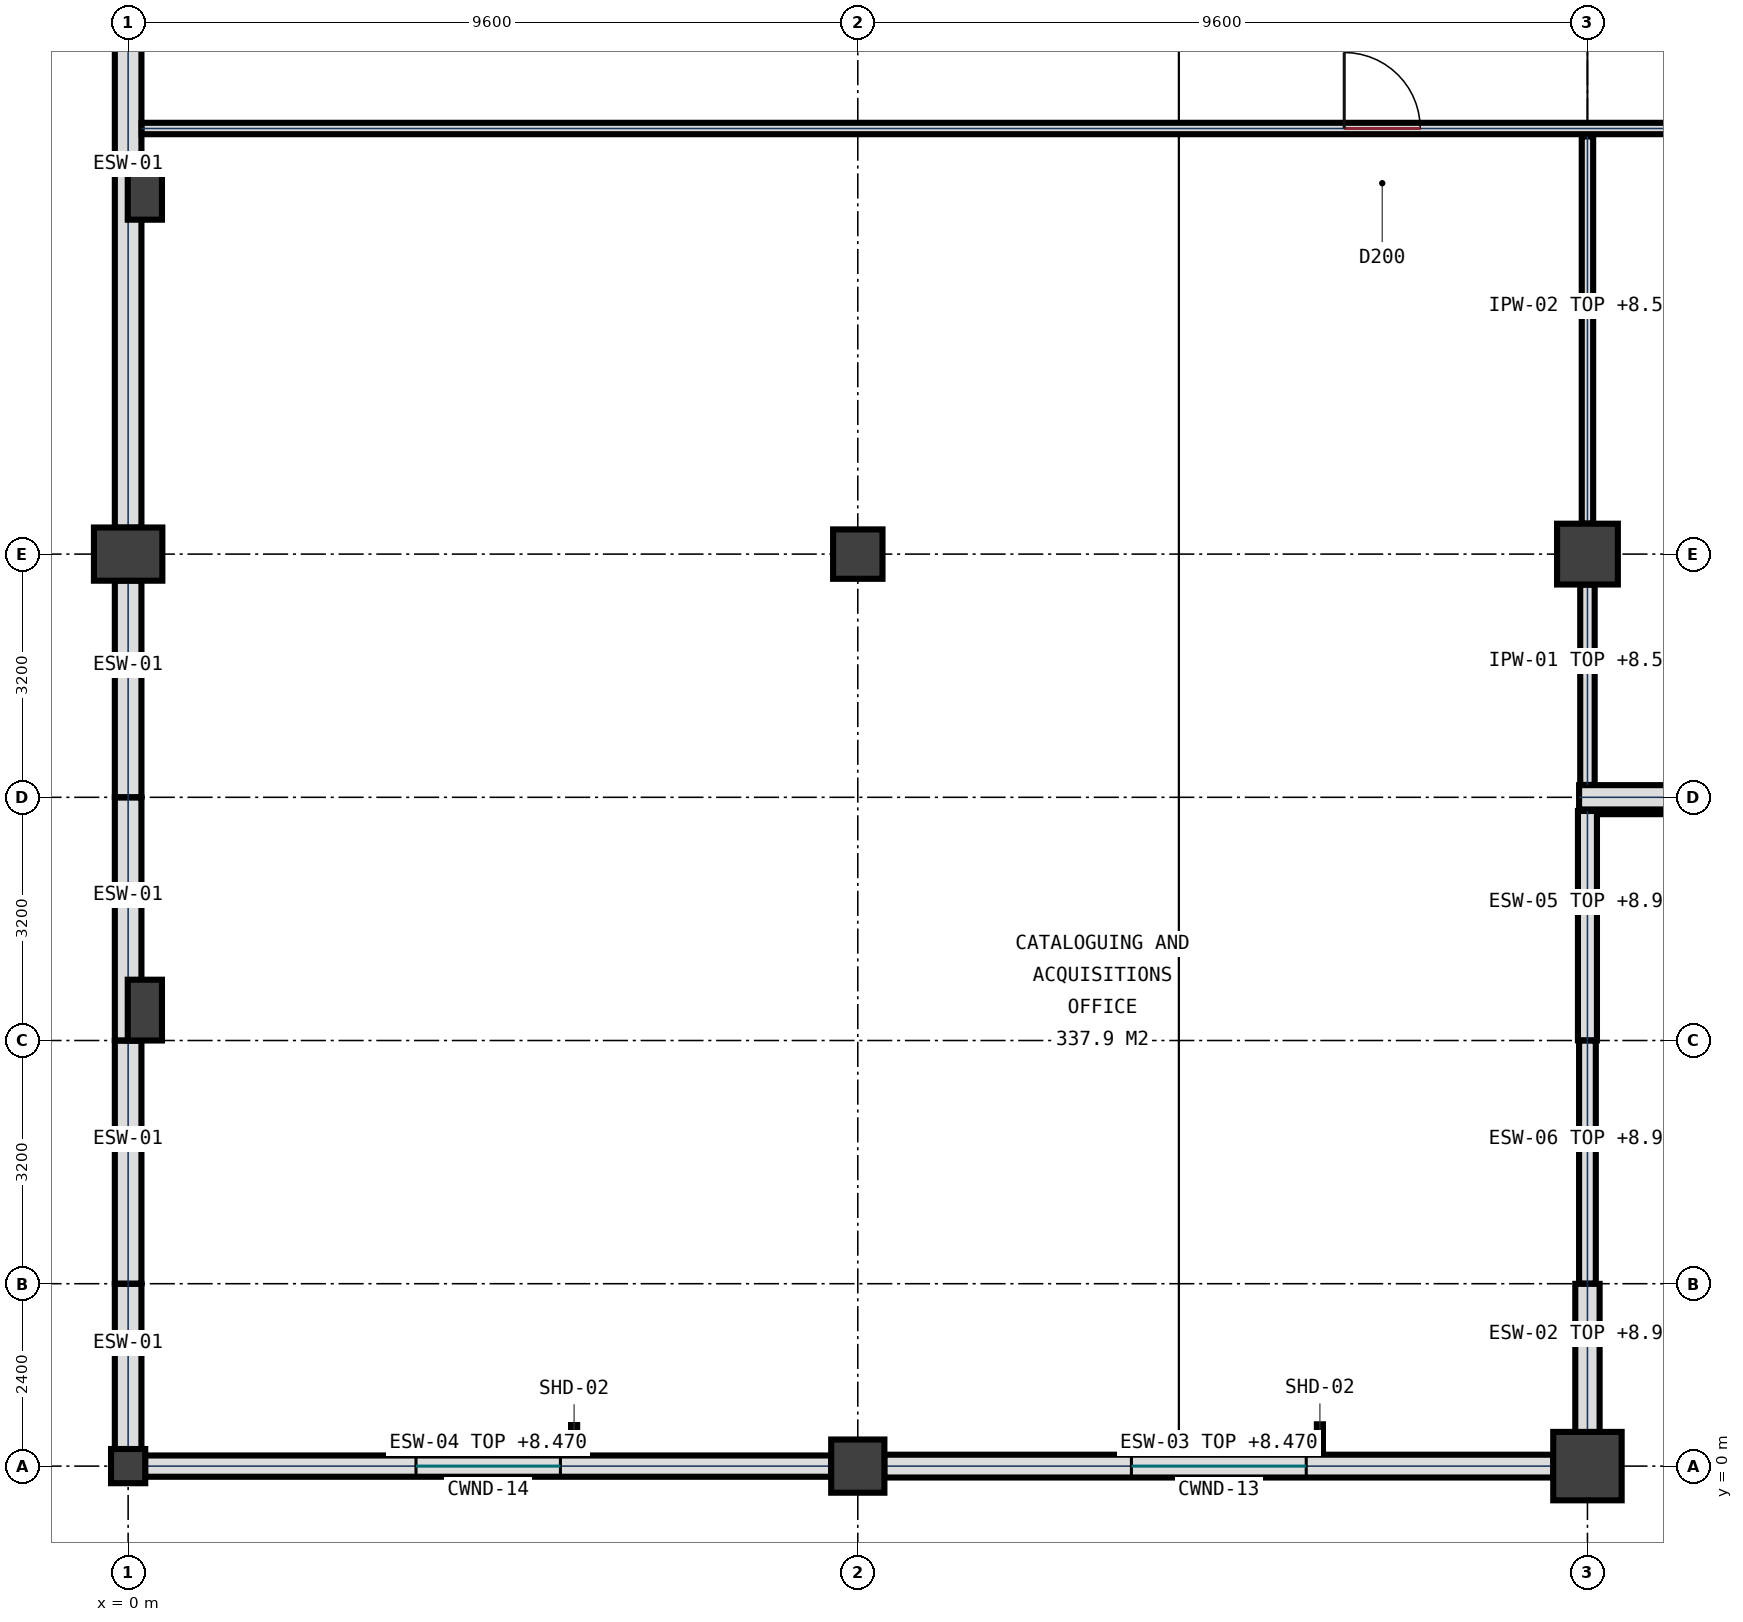
"""IFC4 building model, lengths in metres.
Left out: names, types, materials, properties, quantities, classifications, styles, units other than length and angle.
Written with IfcOpenShell. Run it as: python <this file> out.ifc"""

import sys

from ifc_helpers import new_model, si_unit, direction, frame, frame_2d, origin, origin_with_axes, origin_2d, place, context, subcontext, project, spatial, polyline, rectangle, circle, outline, extrude, element, fill, save


model = new_model("IFC4")
c1 = context("Model", 3, precision=1e-05, world=origin(), true_north=direction((0.0, 1.0)))
c2 = subcontext(c1, "Body", "Model", "MODEL_VIEW")
j1 = project(units=[si_unit("LENGTHUNIT", "METRE"), si_unit("PLANEANGLEUNIT", "RADIAN")], contexts=[c1])
p1 = place(None, origin())
s1 = spatial("IfcSite", under=j1, at=p1, CompositionType="ELEMENT")
p2 = place(p1, origin())
s2 = spatial("IfcBuilding", under=s1, at=p2, CompositionType="ELEMENT")
p3 = place(p2, frame((0.0, 0.0, 5.4)))
s3 = spatial("IfcBuildingStorey", under=s2, at=p3, CompositionType="ELEMENT", Elevation=5.4)
p4 = place(p3, origin_with_axes())
e1 = element("IfcColumn", 1, at=p4, inside=s3, PredefinedType="COLUMN", context=c2, shape_type="SweptSolid", body=[
    extrude(rectangle(XDim=0.45, YDim=0.45, at=origin_2d()), origin(), (0.0, 0.0, 1.0), 4.5),
])
p5 = place(p3, frame((0.0, 12.0, 0.0), z_axis=(0.0, 0.0, 1.0), x_axis=(1.0, 0.0, 0.0)))
e2 = element("IfcColumn", 2, at=p5, inside=s3, PredefinedType="COLUMN", context=c2, shape_type="SweptSolid", body=[
    extrude(rectangle(XDim=0.9, YDim=0.7, at=origin_2d()), origin(), (0.0, 0.0, 1.0), 4.5),
])
p6 = place(p3, frame((9.6, 0.0, 0.0), z_axis=(0.0, 0.0, 1.0), x_axis=(1.0, 0.0, 0.0)))
e3 = element("IfcColumn", 3, at=p6, inside=s3, PredefinedType="COLUMN", context=c2, shape_type="SweptSolid", body=[
    extrude(rectangle(XDim=0.7, YDim=0.7, at=origin_2d()), origin(), (0.0, 0.0, 1.0), 4.5),
])
p7 = place(p3, frame((9.6, 12.0, 0.0), z_axis=(0.0, 0.0, 1.0), x_axis=(1.0, 0.0, 0.0)))
e4 = element("IfcColumn", 4, at=p7, inside=s3, PredefinedType="COLUMN", context=c2, shape_type="SweptSolid", body=[
    extrude(rectangle(XDim=0.65, YDim=0.65, at=origin_2d()), origin(), (0.0, 0.0, 1.0), 4.5),
])
p8 = place(p3, frame((19.2, 0.0, 0.0), z_axis=(0.0, 0.0, 1.0), x_axis=(1.0, 0.0, 0.0)))
e5 = element("IfcColumn", 5, at=p8, inside=s3, PredefinedType="COLUMN", context=c2, shape_type="SweptSolid", body=[
    extrude(circle(Radius=0.45, at=origin_2d()), origin(), (0.0, 0.0, 1.0), 4.5),
])
p9 = place(p3, frame((19.2, 12.0, 0.0), z_axis=(0.0, 0.0, 1.0), x_axis=(1.0, 0.0, 0.0)))
e6 = element("IfcColumn", 6, at=p9, inside=s3, PredefinedType="COLUMN", context=c2, shape_type="SweptSolid", body=[
    extrude(circle(Radius=0.4, at=origin_2d()), origin(), (0.0, 0.0, 1.0), 4.5),
])
for number, where, z_axis, x_axis in (
    (7, (0.22, 6.0, 0.0), (0.0, 0.0, 1.0), (1.0, 0.0, 0.0)),
    (8, (0.22, 16.8, 0.0), (0.0, 0.0, 1.0), (1.0, 0.0, 0.0)),
):
    element("IfcColumn", number, at=place(p3, frame(where, z_axis=z_axis, x_axis=x_axis)), inside=s3, PredefinedType="PILASTER", context=c2, shape_type="SweptSolid", body=[
        extrude(rectangle(XDim=0.45, YDim=0.8, at=origin_2d()), origin(), (0.0, 0.0, 1.0), 4.5),
    ])
p10 = place(p3, frame((19.2, 8.62, 0.0), z_axis=(0.0, 0.0, 1.0), x_axis=(0.0, -1.0, 0.0)))
e9 = element("IfcWall", 9, at=p10, inside=s3, PredefinedType="SOLIDWALL", context=c2, shape_type="SweptSolid", body=[
    extrude(rectangle(XDim=3.018, YDim=0.25, at=frame_2d((1.509, 0.0))), origin(), (0.0, 0.0, 1.0), 3.57),
])
p11 = place(p3, frame((19.2, 5.598, 0.0), z_axis=(0.0, 0.0, 1.0), x_axis=(0.0, -1.0, 0.0)))
e10 = element("IfcWall", 10, at=p11, inside=s3, PredefinedType="SOLIDWALL", context=c2, shape_type="SweptSolid", body=[
    extrude(rectangle(XDim=3.196, YDim=0.22, at=frame_2d((1.598, 0.0))), origin(), (0.0, 0.0, 1.0), 3.57),
])
p12 = place(p3, frame((19.2, 2.398, 0.0), z_axis=(0.0, 0.0, 1.0), x_axis=(0.0, -1.0, 0.0)))
e11 = element("IfcWall", 11, at=p12, inside=s3, PredefinedType="SOLIDWALL", context=c2, shape_type="SweptSolid", body=[
    extrude(rectangle(XDim=1.95, YDim=0.32, at=frame_2d((0.975, 0.0))), origin(), (0.0, 0.0, 1.0), 3.57),
])
p13 = place(p3, frame((18.752, 0.0, 0.0), z_axis=(0.0, 0.0, 1.0), x_axis=(-1.0, 0.0, 0.0)))
e12 = element("IfcWall", 12, at=p13, inside=s3, PredefinedType="SOLIDWALL", context=c2, shape_type="SweptSolid", body=[
    extrude(rectangle(XDim=8.804, YDim=0.3, at=frame_2d((4.402, 0.0))), origin(), (0.0, 0.0, 1.0), 3.07),
])
p14 = place(p13, frame((3.252, 0.0, 0.95)))
e13 = element("IfcOpeningElement", 13, at=p14, cuts=e12, PredefinedType="OPENING", context=c2, shape_type="SweptSolid", body=[
    extrude(rectangle(XDim=2.3, YDim=1.4, at=frame_2d((1.15, 0.7))), frame((0.0, 0.16, 0.0), z_axis=(0.0, -1.0, 0.0), x_axis=(1.0, 0.0, 0.0)), (0.0, 0.0, 1.0), 0.32),
])
p15 = place(p3, frame((9.252, 0.0, 0.0), z_axis=(0.0, 0.0, 1.0), x_axis=(-1.0, 0.0, 0.0)))
e14 = element("IfcWall", 14, at=p15, inside=s3, PredefinedType="SOLIDWALL", context=c2, shape_type="SweptSolid", body=[
    extrude(rectangle(XDim=9.029, YDim=0.28, at=frame_2d((4.515, 0.0))), origin(), (0.0, 0.0, 1.0), 3.07),
])
p16 = place(p15, frame((3.564, 0.0, 0.95)))
e15 = element("IfcOpeningElement", 15, at=p16, cuts=e14, PredefinedType="OPENING", context=c2, shape_type="SweptSolid", body=[
    extrude(rectangle(XDim=1.9, YDim=1.4, at=frame_2d((0.95, 0.7))), frame((0.0, 0.15, 0.0), z_axis=(0.0, -1.0, 0.0), x_axis=(1.0, 0.0, 0.0)), (0.0, 0.0, 1.0), 0.3),
])
p17 = place(p3, frame((0.0, 0.223, 0.0), z_axis=(0.0, 0.0, 1.0), x_axis=(0.0, 1.0, 0.0)))
e16 = element("IfcWall", 16, at=p17, inside=s3, PredefinedType="SOLIDWALL", context=c2, shape_type="SweptSolid", body=[
    extrude(rectangle(XDim=2.175, YDim=0.35, at=frame_2d((1.087, 0.0))), origin(), (0.0, 0.0, 1.0), 4.22),
])
p18 = place(p3, frame((0.0, 2.402, 0.0), z_axis=(0.0, 0.0, 1.0), x_axis=(0.0, 1.0, 0.0)))
e17 = element("IfcWall", 17, at=p18, inside=s3, PredefinedType="SOLIDWALL", context=c2, shape_type="SweptSolid", body=[
    extrude(rectangle(XDim=3.196, YDim=0.35, at=frame_2d((1.598, 0.0))), origin(), (0.0, 0.0, 1.0), 4.22),
])
p19 = place(p3, frame((0.0, 5.602, 0.0), z_axis=(0.0, 0.0, 1.0), x_axis=(0.0, 1.0, 0.0)))
e18 = element("IfcWall", 18, at=p19, inside=s3, PredefinedType="SOLIDWALL", context=c2, shape_type="SweptSolid", body=[
    extrude(rectangle(XDim=3.196, YDim=0.35, at=frame_2d((1.598, 0.0))), origin(), (0.0, 0.0, 1.0), 4.22),
])
p20 = place(p3, frame((0.0, 8.802, 0.0), z_axis=(0.0, 0.0, 1.0), x_axis=(0.0, 1.0, 0.0)))
e19 = element("IfcWall", 19, at=p20, inside=s3, PredefinedType="SOLIDWALL", context=c2, shape_type="SweptSolid", body=[
    extrude(rectangle(XDim=2.85, YDim=0.35, at=frame_2d((1.425, 0.0))), origin(), (0.0, 0.0, 1.0), 4.22),
])
p21 = place(p3, frame((0.0, 12.348, 0.0), z_axis=(0.0, 0.0, 1.0), x_axis=(0.0, 1.0, 0.0)))
e20 = element("IfcWall", 20, at=p21, inside=s3, PredefinedType="SOLIDWALL", context=c2, shape_type="SweptSolid", body=[
    extrude(rectangle(XDim=8.954, YDim=0.35, at=frame_2d((4.477, 0.0))), origin(), (0.0, 0.0, 1.0), 4.22),
])
p22 = place(p3, frame((32.698, 8.8, 0.0), z_axis=(0.0, 0.0, 1.0), x_axis=(-1.0, 0.0, 0.0)))
e21 = element("IfcWall", 21, at=p22, inside=s3, PredefinedType="SOLIDWALL", context=c2, shape_type="SweptSolid", body=[
    extrude(rectangle(XDim=13.608, YDim=0.32, at=frame_2d((6.804, 0.0))), origin(), (0.0, 0.0, 1.0), 3.52),
])
p23 = place(p22, frame((5.404, 0.0, 1.1)))
e22 = element("IfcOpeningElement", 22, at=p23, cuts=e21, PredefinedType="OPENING", context=c2, shape_type="SweptSolid", body=[
    extrude(outline(polyline([(0.375, 0.75), (0.247, 0.727), (0.134, 0.662), (0.05, 0.562), (0.006, 0.44), (0.006, 0.31), (0.05, 0.188), (0.134, 0.088), (0.247, 0.023), (0.375, 0.0), (2.425, 0.0), (2.553, 0.023), (2.666, 0.088), (2.75, 0.188), (2.794, 0.31), (2.794, 0.44), (2.75, 0.562), (2.666, 0.662), (2.553, 0.727), (2.425, 0.75), (0.375, 0.75)])), frame((0.0, 0.17, 0.0), z_axis=(0.0, -1.0, 0.0), x_axis=(1.0, 0.0, 0.0)), (0.0, 0.0, 1.0), 0.34),
])
p24 = place(p3, frame((0.178, 17.6, 0.0), z_axis=(0.0, 0.0, 1.0), x_axis=(1.0, 0.0, 0.0)))
e23 = element("IfcWall", 23, at=p24, inside=s3, PredefinedType="PARTITIONING", context=c2, shape_type="SweptSolid", body=[
    extrude(rectangle(XDim=74.772, YDim=0.15, at=frame_2d((37.386, 0.0))), origin(), (0.0, 0.0, 1.0), 3.21),
])
p25 = place(p24, frame((15.822, 0.0, 0.0)))
e24 = element("IfcOpeningElement", 24, at=p25, cuts=e23, PredefinedType="OPENING", context=c2, shape_type="SweptSolid", body=[
    extrude(rectangle(XDim=1.0, YDim=2.2, at=frame_2d((0.5, 1.1))), frame((0.0, 0.085, 0.0), z_axis=(0.0, -1.0, 0.0), x_axis=(1.0, 0.0, 0.0)), (0.0, 0.0, 1.0), 0.17),
])
p26 = place(p24, frame((51.797, 0.0, 0.0)))
e25 = element("IfcOpeningElement", 25, at=p26, cuts=e23, PredefinedType="OPENING", context=c2, shape_type="SweptSolid", body=[
    extrude(rectangle(XDim=1.85, YDim=2.35, at=frame_2d((0.925, 1.175))), frame((0.0, 0.085, 0.0), z_axis=(0.0, -1.0, 0.0), x_axis=(1.0, 0.0, 0.0)), (0.0, 0.0, 1.0), 0.17),
])
p27 = place(p3, frame((19.2, 8.963, 0.0), z_axis=(0.0, 0.0, 1.0), x_axis=(0.0, 1.0, 0.0)))
e26 = element("IfcWall", 26, at=p27, inside=s3, PredefinedType="PARTITIONING", context=c2, shape_type="SweptSolid", body=[
    extrude(rectangle(XDim=2.634, YDim=0.19, at=frame_2d((1.317, 0.0))), origin(), (0.0, 0.0, 1.0), 3.17),
])
p28 = place(p3, frame((19.2, 12.403, 0.0), z_axis=(0.0, 0.0, 1.0), x_axis=(0.0, 1.0, 0.0)))
e27 = element("IfcWall", 27, at=p28, inside=s3, PredefinedType="PARTITIONING", context=c2, shape_type="SweptSolid", body=[
    extrude(rectangle(XDim=5.092, YDim=0.15, at=frame_2d((2.546, 0.0))), origin(), (0.0, 0.0, 1.0), 3.17),
])
p29 = place(p14, origin())
e28 = element("IfcWindow", 28, at=p29, inside=s3, PartitioningType="SINGLE_PANEL", PredefinedType="WINDOW", context=c2, shape_type="SweptSolid", body=[
    extrude(rectangle(XDim=2.3, YDim=1.4, at=frame_2d((1.15, 0.7))), frame((0.0, 0.032, 0.0), z_axis=(0.0, -1.0, 0.0), x_axis=(1.0, 0.0, 0.0)), (0.0, 0.0, 1.0), 0.065),
])
fill(e13, e28)
p30 = place(p16, origin())
e29 = element("IfcWindow", 29, at=p30, inside=s3, PartitioningType="SINGLE_PANEL", PredefinedType="WINDOW", context=c2, shape_type="SweptSolid", body=[
    extrude(rectangle(XDim=1.9, YDim=1.4, at=frame_2d((0.95, 0.7))), frame((0.0, 0.032, 0.0), z_axis=(0.0, -1.0, 0.0), x_axis=(1.0, 0.0, 0.0)), (0.0, 0.0, 1.0), 0.065),
])
fill(e15, e29)
p31 = place(p25, origin())
e30 = element("IfcDoor", 30, at=p31, inside=s3, OperationType="SINGLE_SWING_LEFT", PredefinedType="DOOR", context=c2, shape_type="SweptSolid", body=[
    extrude(rectangle(XDim=1.0, YDim=2.2, at=frame_2d((0.5, 1.1))), frame((0.0, 0.032, 0.0), z_axis=(0.0, -1.0, 0.0), x_axis=(1.0, 0.0, 0.0)), (0.0, 0.0, 1.0), 0.065),
])
fill(e24, e30)
save(model, sys.argv[1])
